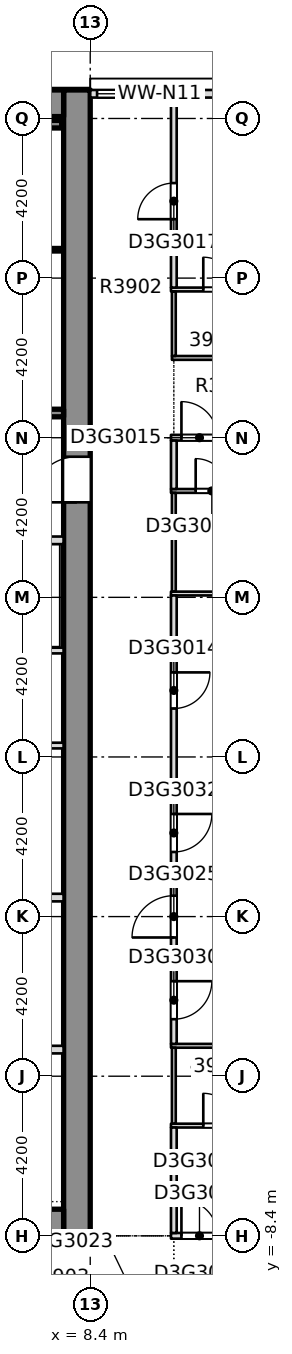
"""IFC4 building model, lengths in metres.
Left out: names, types, materials, properties, quantities, classifications, styles, units other than length and angle.
Written with IfcOpenShell. Run it as: python <this file> out.ifc"""

import sys

from ifc_helpers import new_model, si_unit, direction, frame, frame_2d, origin, place, context, subcontext, project, spatial, rectangle, extrude, element, fill, save


model = new_model("IFC4")
c1 = context("Model", 3, precision=1e-05, world=origin(), true_north=direction((0.0, 1.0)))
c2 = subcontext(c1, "Body", "Model", "MODEL_VIEW")
j1 = project(units=[si_unit("LENGTHUNIT", "METRE"), si_unit("PLANEANGLEUNIT", "RADIAN")], contexts=[c1])
p1 = place(None, origin())
s1 = spatial("IfcSite", under=j1, at=p1, CompositionType="ELEMENT")
p2 = place(p1, origin())
s2 = spatial("IfcBuilding", under=s1, at=p2, CompositionType="ELEMENT")
p3 = place(p2, frame((0.0, 0.0, 153.8)))
s3 = spatial("IfcBuildingStorey", under=s2, at=p3, CompositionType="ELEMENT", Elevation=153.8)
p4 = place(p3, frame((8.05, -8.4, -0.4), z_axis=(0.0, 0.0, 1.0), x_axis=(0.0, 1.0, 0.0)))
e1 = element("IfcWall", 1, at=p4, inside=s3, PredefinedType="SOLIDWALL", context=c2, shape_type="SweptSolid", body=[
    extrude(rectangle(XDim=30.15, YDim=0.7, at=frame_2d((15.075, 0.0))), origin(), (0.0, 0.0, 1.0), 3.45),
])
p5 = place(p4, frame((19.3, 0.0, 0.4)))
e2 = element("IfcOpeningElement", 2, at=p5, cuts=e1, PredefinedType="OPENING", context=c2, shape_type="SweptSolid", body=[
    extrude(rectangle(XDim=1.2, YDim=2.1, at=frame_2d((0.6, 1.05))), frame((0.0, 0.36, 0.0), z_axis=(0.0, -1.0, 0.0), x_axis=(1.0, 0.0, 0.0)), (0.0, 0.0, 1.0), 0.72),
])
p6 = place(p3, frame((-7.7, -8.05, -0.4), z_axis=(0.0, 0.0, 1.0), x_axis=(1.0, 0.0, 0.0)))
e3 = element("IfcWall", 3, at=p6, inside=s3, PredefinedType="SHEAR", context=c2, shape_type="SweptSolid", body=[
    extrude(rectangle(XDim=15.4, YDim=0.7, at=frame_2d((7.7, 0.0))), origin(), (0.0, 0.0, 1.0), 3.45),
])
p7 = place(p6, frame((2.95, 0.0, 0.4)))
e4 = element("IfcOpeningElement", 4, at=p7, cuts=e3, PredefinedType="OPENING", context=c2, shape_type="SweptSolid", body=[
    extrude(rectangle(XDim=1.8, YDim=2.1, at=frame_2d((0.9, 1.05))), frame((0.0, 0.36, 0.0), z_axis=(0.0, -1.0, 0.0), x_axis=(1.0, 0.0, 0.0)), (0.0, 0.0, 1.0), 0.72),
])
p8 = place(p6, frame((10.65, 0.0, 0.4)))
e5 = element("IfcOpeningElement", 5, at=p8, cuts=e3, PredefinedType="OPENING", context=c2, shape_type="SweptSolid", body=[
    extrude(rectangle(XDim=1.8, YDim=2.1, at=frame_2d((0.9, 1.05))), frame((0.0, 0.36, 0.0), z_axis=(0.0, -1.0, 0.0), x_axis=(1.0, 0.0, 0.0)), (0.0, 0.0, 1.0), 0.72),
])
p9 = place(p3, frame((-7.7, 21.4, -0.4), z_axis=(0.0, 0.0, 1.0), x_axis=(1.0, 0.0, 0.0)))
e6 = element("IfcWall", 6, at=p9, inside=s3, PredefinedType="SHEAR", context=c2, shape_type="SweptSolid", body=[
    extrude(rectangle(XDim=15.4, YDim=0.7, at=frame_2d((7.7, 0.0))), origin(), (0.0, 0.0, 1.0), 3.45),
])
p10 = place(p3, frame((10.525, -8.4, 0.0), z_axis=(0.0, 0.0, 1.0), x_axis=(1.0, 0.0, 0.0)))
e7 = element("IfcWall", 7, at=p10, inside=s3, PredefinedType="PARTITIONING", context=c2, shape_type="SweptSolid", body=[
    extrude(rectangle(XDim=11.025, YDim=0.15, at=frame_2d((5.513, 0.0))), origin(), (0.0, 0.0, 1.0), 3.05),
])
p11 = place(p10, frame((0.275, 0.0, 0.0)))
e8 = element("IfcOpeningElement", 8, at=p11, cuts=e7, PredefinedType="OPENING", context=c2, shape_type="SweptSolid", body=[
    extrude(rectangle(XDim=0.95, YDim=2.1, at=frame_2d((0.475, 1.05))), frame((0.0, 0.085, 0.0), z_axis=(0.0, -1.0, 0.0), x_axis=(1.0, 0.0, 0.0)), (0.0, 0.0, 1.0), 0.17),
])
p12 = place(p3, frame((10.525, -5.5, 0.0), z_axis=(0.0, 0.0, 1.0), x_axis=(1.0, 0.0, 0.0)))
e9 = element("IfcWall", 9, at=p12, inside=s3, PredefinedType="PARTITIONING", context=c2, shape_type="SweptSolid", body=[
    extrude(rectangle(XDim=2.523, YDim=0.1, at=frame_2d((1.262, 0.0))), origin(), (0.0, 0.0, 1.0), 3.05),
])
p13 = place(p12, frame((0.85, 0.0, 0.0)))
e10 = element("IfcOpeningElement", 10, at=p13, cuts=e9, PredefinedType="OPENING", context=c2, shape_type="SweptSolid", body=[
    extrude(rectangle(XDim=0.85, YDim=2.1, at=frame_2d((0.425, 1.05))), frame((0.0, 0.06, 0.0), z_axis=(0.0, -1.0, 0.0), x_axis=(1.0, 0.0, 0.0)), (0.0, 0.0, 1.0), 0.12),
])
p14 = place(p3, frame((10.525, -3.4, 0.0), z_axis=(0.0, 0.0, 1.0), x_axis=(1.0, 0.0, 0.0)))
e11 = element("IfcWall", 11, at=p14, inside=s3, PredefinedType="PARTITIONING", context=c2, shape_type="SweptSolid", body=[
    extrude(rectangle(XDim=2.525, YDim=0.1, at=frame_2d((1.263, 0.0))), origin(), (0.0, 0.0, 1.0), 3.05),
])
for number, where, z_axis, x_axis in (
    (12, (10.675, -1.0, 0.0), (0.0, 0.0, 1.0), (1.0, 0.0, 0.0)),
    (13, (10.675, 1.0, 0.0), (0.0, 0.0, 1.0), (1.0, 0.0, 0.0)),
):
    element("IfcWall", number, at=place(p3, frame(where, z_axis=z_axis, x_axis=x_axis)), inside=s3, PredefinedType="PARTITIONING", context=c2, shape_type="SweptSolid", body=[
        extrude(rectangle(XDim=6.075, YDim=0.2, at=frame_2d((3.038, 0.0))), origin(), (0.0, 0.0, 1.0), 3.05),
    ])
p15 = place(p3, frame((10.675, 3.4, 0.0), z_axis=(0.0, 0.0, 1.0), x_axis=(1.0, 0.0, 0.0)))
e14 = element("IfcWall", 14, at=p15, inside=s3, PredefinedType="SOLIDWALL", context=c2, shape_type="SweptSolid", body=[
    extrude(rectangle(XDim=10.875, YDim=0.2, at=frame_2d((5.438, 0.0))), origin(), (0.0, 0.0, 1.0), 3.05),
])
p16 = place(p3, frame((10.525, 8.5, 0.0), z_axis=(0.0, 0.0, 1.0), x_axis=(1.0, 0.0, 0.0)))
e15 = element("IfcWall", 15, at=p16, inside=s3, PredefinedType="PARTITIONING", context=c2, shape_type="SweptSolid", body=[
    extrude(rectangle(XDim=2.825, YDim=0.1, at=frame_2d((1.413, 0.0))), origin(), (0.0, 0.0, 1.0), 3.05),
])
p17 = place(p3, frame((10.525, 11.2, 0.0), z_axis=(0.0, 0.0, 1.0), x_axis=(1.0, 0.0, 0.0)))
e16 = element("IfcWall", 16, at=p17, inside=s3, PredefinedType="PARTITIONING", context=c2, shape_type="SweptSolid", body=[
    extrude(rectangle(XDim=2.825, YDim=0.1, at=frame_2d((1.413, 0.0))), origin(), (0.0, 0.0, 1.0), 3.05),
])
p18 = place(p17, frame((0.65, 0.0, 0.0)))
e17 = element("IfcOpeningElement", 17, at=p18, cuts=e16, PredefinedType="OPENING", context=c2, shape_type="SweptSolid", body=[
    extrude(rectangle(XDim=0.85, YDim=2.1, at=frame_2d((0.425, 1.05))), frame((0.0, 0.06, 0.0), z_axis=(0.0, -1.0, 0.0), x_axis=(1.0, 0.0, 0.0)), (0.0, 0.0, 1.0), 0.12),
])
p19 = place(p3, frame((10.525, 12.6, 0.0), z_axis=(0.0, 0.0, 1.0), x_axis=(1.0, 0.0, 0.0)))
e18 = element("IfcWall", 18, at=p19, inside=s3, PredefinedType="PARTITIONING", context=c2, shape_type="SweptSolid", body=[
    extrude(rectangle(XDim=2.625, YDim=0.15, at=frame_2d((1.312, 0.0))), origin(), (0.0, 0.0, 1.0), 3.05),
])
p20 = place(p19, frame((0.275, 0.0, 0.0)))
e19 = element("IfcOpeningElement", 19, at=p20, cuts=e18, PredefinedType="OPENING", context=c2, shape_type="SweptSolid", body=[
    extrude(rectangle(XDim=0.95, YDim=2.1, at=frame_2d((0.475, 1.05))), frame((0.0, 0.085, 0.0), z_axis=(0.0, -1.0, 0.0), x_axis=(1.0, 0.0, 0.0)), (0.0, 0.0, 1.0), 0.17),
])
p21 = place(p3, frame((10.55, 14.7, 0.0), z_axis=(0.0, 0.0, 1.0), x_axis=(1.0, 0.0, 0.0)))
e20 = element("IfcWall", 20, at=p21, inside=s3, PredefinedType="PARTITIONING", context=c2, shape_type="SweptSolid", body=[
    extrude(rectangle(XDim=2.5, YDim=0.1, at=frame_2d((1.25, 0.0))), origin(), (0.0, 0.0, 1.0), 3.05),
])
p22 = place(p3, frame((10.525, 16.5, 0.0), z_axis=(0.0, 0.0, 1.0), x_axis=(1.0, 0.0, 0.0)))
e21 = element("IfcWall", 21, at=p22, inside=s3, PredefinedType="PARTITIONING", context=c2, shape_type="SweptSolid", body=[
    extrude(rectangle(XDim=2.525, YDim=0.1, at=frame_2d((1.263, 0.0))), origin(), (0.0, 0.0, 1.0), 3.05),
])
p23 = place(p22, frame((0.85, 0.0, 0.0)))
e22 = element("IfcOpeningElement", 22, at=p23, cuts=e21, PredefinedType="OPENING", context=c2, shape_type="SweptSolid", body=[
    extrude(rectangle(XDim=0.85, YDim=2.1, at=frame_2d((0.425, 1.05))), frame((0.0, 0.06, 0.0), z_axis=(0.0, -1.0, 0.0), x_axis=(1.0, 0.0, 0.0)), (0.0, 0.0, 1.0), 0.12),
])
p24 = place(p3, frame((10.6, -8.325, 0.0), z_axis=(0.0, 0.0, 1.0), x_axis=(0.0, 1.0, 0.0)))
e23 = element("IfcWall", 23, at=p24, inside=s3, PredefinedType="PARTITIONING", context=c2, shape_type="SweptSolid", body=[
    extrude(rectangle(XDim=2.775, YDim=0.15, at=frame_2d((1.387, 0.0))), origin(), (0.0, 0.0, 1.0), 3.05),
])
p25 = place(p3, frame((10.6, -5.45, 0.0), z_axis=(0.0, 0.0, 1.0), x_axis=(0.0, 1.0, 0.0)))
e24 = element("IfcWall", 24, at=p25, inside=s3, PredefinedType="PARTITIONING", context=c2, shape_type="SweptSolid", body=[
    extrude(rectangle(XDim=2.0, YDim=0.1, at=frame_2d((1.0, 0.0))), origin(), (0.0, 0.0, 1.0), 3.05),
])
p26 = place(p3, frame((10.6, -3.35, 0.0), z_axis=(0.0, 0.0, 1.0), x_axis=(0.0, 1.0, 0.0)))
e25 = element("IfcWall", 25, at=p26, inside=s3, PredefinedType="PARTITIONING", context=c2, shape_type="SweptSolid", body=[
    extrude(rectangle(XDim=11.8, YDim=0.15, at=frame_2d((5.9, 0.0))), origin(), (0.0, 0.0, 1.0), 3.05),
])
p27 = place(p26, frame((8.825, 0.0, 0.0)))
e26 = element("IfcOpeningElement", 26, at=p27, cuts=e25, PredefinedType="OPENING", context=c2, shape_type="SweptSolid", body=[
    extrude(rectangle(XDim=0.95, YDim=2.1, at=frame_2d((0.475, 1.05))), frame((0.0, 0.085, 0.0), z_axis=(0.0, -1.0, 0.0), x_axis=(1.0, 0.0, 0.0)), (0.0, 0.0, 1.0), 0.17),
])
p28 = place(p26, frame((2.8, 0.0, 0.0)))
e27 = element("IfcOpeningElement", 27, at=p28, cuts=e25, PredefinedType="OPENING", context=c2, shape_type="SweptSolid", body=[
    extrude(rectangle(XDim=1.1, YDim=2.1, at=frame_2d((0.55, 1.05))), frame((0.0, 0.085, 0.0), z_axis=(0.0, -1.0, 0.0), x_axis=(1.0, 0.0, 0.0)), (0.0, 0.0, 1.0), 0.17),
])
p29 = place(p26, frame((0.65, 0.0, 0.0)))
e28 = element("IfcOpeningElement", 28, at=p29, cuts=e25, PredefinedType="OPENING", context=c2, shape_type="SweptSolid", body=[
    extrude(rectangle(XDim=1.0, YDim=2.1, at=frame_2d((0.5, 1.05))), frame((0.0, 0.085, 0.0), z_axis=(0.0, -1.0, 0.0), x_axis=(1.0, 0.0, 0.0)), (0.0, 0.0, 1.0), 0.17),
])
p30 = place(p26, frame((5.05, 0.0, 0.0)))
e29 = element("IfcOpeningElement", 29, at=p30, cuts=e25, PredefinedType="OPENING", context=c2, shape_type="SweptSolid", body=[
    extrude(rectangle(XDim=1.0, YDim=2.1, at=frame_2d((0.5, 1.05))), frame((0.0, 0.085, 0.0), z_axis=(0.0, -1.0, 0.0), x_axis=(1.0, 0.0, 0.0)), (0.0, 0.0, 1.0), 0.17),
])
p31 = place(p3, frame((10.6, 8.55, 0.0), z_axis=(0.0, 0.0, 1.0), x_axis=(0.0, 1.0, 0.0)))
e30 = element("IfcWall", 30, at=p31, inside=s3, PredefinedType="PARTITIONING", context=c2, shape_type="SweptSolid", body=[
    extrude(rectangle(XDim=2.6, YDim=0.1, at=frame_2d((1.3, 0.0))), origin(), (0.0, 0.0, 1.0), 3.05),
])
p32 = place(p3, frame((10.6, 11.25, 0.0), z_axis=(0.0, 0.0, 1.0), x_axis=(0.0, 1.0, 0.0)))
e31 = element("IfcWall", 31, at=p32, inside=s3, PredefinedType="PARTITIONING", context=c2, shape_type="SweptSolid", body=[
    extrude(rectangle(XDim=1.275, YDim=0.15, at=frame_2d((0.637, 0.0))), origin(), (0.0, 0.0, 1.0), 3.05),
])
p33 = place(p3, frame((10.6, 14.75, 0.0), z_axis=(0.0, 0.0, 1.0), x_axis=(0.0, 1.0, 0.0)))
e32 = element("IfcWall", 32, at=p33, inside=s3, PredefinedType="PARTITIONING", context=c2, shape_type="SweptSolid", body=[
    extrude(rectangle(XDim=1.7, YDim=0.1, at=frame_2d((0.85, 0.0))), origin(), (0.0, 0.0, 1.0), 3.05),
])
p34 = place(p3, frame((10.6, 16.55, 0.0), z_axis=(0.0, 0.0, 1.0), x_axis=(0.0, 1.0, 0.0)))
e33 = element("IfcWall", 33, at=p34, inside=s3, PredefinedType="PARTITIONING", context=c2, shape_type="SweptSolid", body=[
    extrude(rectangle(XDim=5.0, YDim=0.15, at=frame_2d((2.5, 0.0))), origin(), (0.0, 0.0, 1.0), 3.05),
])
p35 = place(p34, frame((1.8, 0.0, 0.0)))
e34 = element("IfcOpeningElement", 34, at=p35, cuts=e33, PredefinedType="OPENING", context=c2, shape_type="SweptSolid", body=[
    extrude(rectangle(XDim=0.95, YDim=2.1, at=frame_2d((0.475, 1.05))), frame((0.0, 0.085, 0.0), z_axis=(0.0, -1.0, 0.0), x_axis=(1.0, 0.0, 0.0)), (0.0, 0.0, 1.0), 0.17),
])
p36 = place(p3, frame((12.05, 21.65, 0.0), z_axis=(0.0, 0.0, 1.0), x_axis=(-1.0, 0.0, 0.0)))
e35 = element("IfcWall", 35, at=p36, inside=s3, PredefinedType="STANDARD", context=c2, shape_type="SweptSolid", body=[
    extrude(rectangle(XDim=3.65, YDim=0.2, at=frame_2d((1.825, 0.0))), origin(), (0.0, 0.0, 1.0), 3.05),
])
p37 = place(p36, frame((1.67, 0.0, 0.2)))
e36 = element("IfcOpeningElement", 36, at=p37, cuts=e35, PredefinedType="OPENING", context=c2, shape_type="SweptSolid", body=[
    extrude(rectangle(XDim=1.8, YDim=2.65, at=frame_2d((0.9, 1.325))), frame((0.0, 0.11, 0.0), z_axis=(0.0, -1.0, 0.0), x_axis=(1.0, 0.0, 0.0)), (0.0, 0.0, 1.0), 0.22),
])
for number, where, z_axis, x_axis in (
    (37, (5.575, -3.5, 0.0), (0.0, 0.0, 1.0), (1.0, 0.0, 0.0)),
    (38, (5.575, 0.5, 0.0), (0.0, 0.0, 1.0), (1.0, 0.0, 0.0)),
):
    element("IfcWall", number, at=place(p3, frame(where, z_axis=z_axis, x_axis=x_axis)), inside=s3, PredefinedType="PARTITIONING", context=c2, shape_type="SweptSolid", body=[
        extrude(rectangle(XDim=2.124, YDim=0.2, at=frame_2d((1.062, 0.0))), origin(), (0.0, 0.0, 1.0), 3.05),
    ])
p38 = place(p3, frame((5.425, 4.5, 0.0), z_axis=(0.0, 0.0, 1.0), x_axis=(1.0, 0.0, 0.0)))
e39 = element("IfcWall", 39, at=p38, inside=s3, PredefinedType="PARTITIONING", context=c2, shape_type="SweptSolid", body=[
    extrude(rectangle(XDim=2.274, YDim=0.15, at=frame_2d((1.137, 0.0))), origin(), (0.0, 0.0, 1.0), 3.05),
])
p39 = place(p3, frame((-7.699, 7.0, 0.0), z_axis=(0.0, 0.0, 1.0), x_axis=(1.0, 0.0, 0.0)))
e40 = element("IfcWall", 40, at=p39, inside=s3, PredefinedType="PARTITIONING", context=c2, shape_type="SweptSolid", body=[
    extrude(rectangle(XDim=15.398, YDim=0.15, at=frame_2d((7.699, 0.0))), origin(), (0.0, 0.0, 1.0), 3.05),
])
p40 = place(p39, frame((6.999, 0.0, 0.0)))
e41 = element("IfcOpeningElement", 41, at=p40, cuts=e40, PredefinedType="OPENING", context=c2, shape_type="SweptSolid", body=[
    extrude(rectangle(XDim=1.4, YDim=2.1, at=frame_2d((0.7, 1.05))), frame((0.0, 0.085, 0.0), z_axis=(0.0, -1.0, 0.0), x_axis=(1.0, 0.0, 0.0)), (0.0, 0.0, 1.0), 0.17),
])
p41 = place(p3, frame((3.6, 9.9, 0.0), z_axis=(0.0, 0.0, 1.0), x_axis=(1.0, 0.0, 0.0)))
e42 = element("IfcWall", 42, at=p41, inside=s3, PredefinedType="PARTITIONING", context=c2, shape_type="SweptSolid", body=[
    extrude(rectangle(XDim=4.099, YDim=0.2, at=frame_2d((2.049, 0.0))), origin(), (0.0, 0.0, 1.0), 3.05),
])
p42 = place(p41, frame((2.25, 0.0, 0.0)))
e43 = element("IfcOpeningElement", 43, at=p42, cuts=e42, PredefinedType="OPENING", context=c2, shape_type="SweptSolid", body=[
    extrude(rectangle(XDim=1.1, YDim=2.1, at=frame_2d((0.55, 1.05))), frame((0.0, 0.11, 0.0), z_axis=(0.0, -1.0, 0.0), x_axis=(1.0, 0.0, 0.0)), (0.0, 0.0, 1.0), 0.22),
])
p43 = place(p3, frame((3.425, 13.25, 0.0), z_axis=(0.0, 0.0, 1.0), x_axis=(1.0, 0.0, 0.0)))
e44 = element("IfcWall", 44, at=p43, inside=s3, PredefinedType="SOLIDWALL", context=c2, shape_type="SweptSolid", body=[
    extrude(rectangle(XDim=4.274, YDim=0.2, at=frame_2d((2.137, 0.0))), origin(), (0.0, 0.0, 1.0), 3.05),
])
p44 = place(p43, frame((1.825, 0.0, 0.0)))
e45 = element("IfcOpeningElement", 45, at=p44, cuts=e44, PredefinedType="OPENING", context=c2, shape_type="SweptSolid", body=[
    extrude(rectangle(XDim=1.2, YDim=2.1, at=frame_2d((0.6, 1.05))), frame((0.0, 0.11, 0.0), z_axis=(0.0, -1.0, 0.0), x_axis=(1.0, 0.0, 0.0)), (0.0, 0.0, 1.0), 0.22),
])
p45 = place(p3, frame((4.1, 20.85, 0.0), z_axis=(0.0, 0.0, 1.0), x_axis=(1.0, 0.0, 0.0)))
e46 = element("IfcWall", 46, at=p45, inside=s3, PredefinedType="SOLIDWALL", context=c2, shape_type="SweptSolid", body=[
    extrude(rectangle(XDim=3.55, YDim=0.2, at=frame_2d((1.775, 0.0))), origin(), (0.0, 0.0, 1.0), 3.05),
])
p46 = place(p11, origin())
e47 = element("IfcDoor", 47, at=p46, inside=s3, OperationType="SINGLE_SWING_LEFT", PredefinedType="DOOR", context=c2, shape_type="SweptSolid", body=[
    extrude(rectangle(XDim=0.95, YDim=2.1, at=frame_2d((0.475, 1.05))), frame((0.0, 0.025, 0.0), z_axis=(0.0, -1.0, 0.0), x_axis=(1.0, 0.0, 0.0)), (0.0, 0.0, 1.0), 0.05),
])
fill(e8, e47)
p47 = place(p13, origin())
e48 = element("IfcDoor", 48, at=p47, inside=s3, OperationType="SINGLE_SWING_LEFT", PredefinedType="DOOR", context=c2, shape_type="SweptSolid", body=[
    extrude(rectangle(XDim=0.85, YDim=2.1, at=frame_2d((0.425, 1.05))), frame((0.0, 0.025, 0.0), z_axis=(0.0, -1.0, 0.0), x_axis=(1.0, 0.0, 0.0)), (0.0, 0.0, 1.0), 0.05),
])
fill(e10, e48)
p48 = place(p27, origin())
e49 = element("IfcDoor", 49, at=p48, inside=s3, OperationType="SINGLE_SWING_LEFT", PredefinedType="DOOR", context=c2, shape_type="SweptSolid", body=[
    extrude(rectangle(XDim=0.95, YDim=2.1, at=frame_2d((0.475, 1.05))), frame((0.0, 0.025, 0.0), z_axis=(0.0, -1.0, 0.0), x_axis=(1.0, 0.0, 0.0)), (0.0, 0.0, 1.0), 0.05),
])
fill(e26, e49)
p49 = place(p20, origin())
e50 = element("IfcDoor", 50, at=p49, inside=s3, OperationType="SINGLE_SWING_RIGHT", PredefinedType="DOOR", context=c2, shape_type="SweptSolid", body=[
    extrude(rectangle(XDim=0.95, YDim=2.1, at=frame_2d((0.475, 1.05))), frame((0.0, 0.025, 0.0), z_axis=(0.0, -1.0, 0.0), x_axis=(1.0, 0.0, 0.0)), (0.0, 0.0, 1.0), 0.05),
])
fill(e19, e50)
p50 = place(p18, origin())
e51 = element("IfcDoor", 51, at=p50, inside=s3, OperationType="SINGLE_SWING_RIGHT", PredefinedType="DOOR", context=c2, shape_type="SweptSolid", body=[
    extrude(rectangle(XDim=0.85, YDim=2.1, at=frame_2d((0.425, 1.05))), frame((0.0, 0.025, 0.0), z_axis=(0.0, -1.0, 0.0), x_axis=(1.0, 0.0, 0.0)), (0.0, 0.0, 1.0), 0.05),
])
fill(e17, e51)
p51 = place(p35, origin())
e52 = element("IfcDoor", 52, at=p51, inside=s3, OperationType="SINGLE_SWING_LEFT", PredefinedType="DOOR", context=c2, shape_type="SweptSolid", body=[
    extrude(rectangle(XDim=0.95, YDim=2.1, at=frame_2d((0.475, 1.05))), frame((0.0, 0.025, 0.0), z_axis=(0.0, -1.0, 0.0), x_axis=(1.0, 0.0, 0.0)), (0.0, 0.0, 1.0), 0.05),
])
fill(e34, e52)
p52 = place(p23, origin())
e53 = element("IfcDoor", 53, at=p52, inside=s3, OperationType="SINGLE_SWING_RIGHT", PredefinedType="DOOR", context=c2, shape_type="SweptSolid", body=[
    extrude(rectangle(XDim=0.85, YDim=2.1, at=frame_2d((0.425, 1.05))), frame((0.0, 0.025, 0.0), z_axis=(0.0, -1.0, 0.0), x_axis=(1.0, 0.0, 0.0)), (0.0, 0.0, 1.0), 0.05),
])
fill(e22, e53)
p53 = place(p28, origin())
e54 = element("IfcDoor", 54, at=p53, inside=s3, OperationType="SINGLE_SWING_LEFT", PredefinedType="DOOR", context=c2, shape_type="SweptSolid", body=[
    extrude(rectangle(XDim=1.1, YDim=2.1, at=frame_2d((0.55, 1.05))), frame((0.0, 0.025, 0.0), z_axis=(0.0, -1.0, 0.0), x_axis=(1.0, 0.0, 0.0)), (0.0, 0.0, 1.0), 0.05),
])
fill(e27, e54)
p54 = place(p29, origin())
e55 = element("IfcDoor", 55, at=p54, inside=s3, OperationType="SINGLE_SWING_RIGHT", PredefinedType="DOOR", context=c2, shape_type="SweptSolid", body=[
    extrude(rectangle(XDim=1.0, YDim=2.1, at=frame_2d((0.5, 1.05))), frame((0.0, 0.025, 0.0), z_axis=(0.0, -1.0, 0.0), x_axis=(1.0, 0.0, 0.0)), (0.0, 0.0, 1.0), 0.05),
])
fill(e28, e55)
p55 = place(p30, origin())
e56 = element("IfcDoor", 56, at=p55, inside=s3, OperationType="SINGLE_SWING_LEFT", PredefinedType="DOOR", context=c2, shape_type="SweptSolid", body=[
    extrude(rectangle(XDim=1.0, YDim=2.1, at=frame_2d((0.5, 1.05))), frame((0.0, 0.025, 0.0), z_axis=(0.0, -1.0, 0.0), x_axis=(1.0, 0.0, 0.0)), (0.0, 0.0, 1.0), 0.05),
])
fill(e29, e56)
p56 = place(p37, origin())
e57 = element("IfcWindow", 57, at=p56, inside=s3, PartitioningType="SINGLE_PANEL", PredefinedType="WINDOW", context=c2, shape_type="SweptSolid", body=[
    extrude(rectangle(XDim=1.8, YDim=2.65, at=frame_2d((0.9, 1.325))), frame((0.0, 0.03, 0.0), z_axis=(0.0, -1.0, 0.0), x_axis=(1.0, 0.0, 0.0)), (0.0, 0.0, 1.0), 0.06),
])
fill(e36, e57)
p57 = place(p5, origin())
e58 = element("IfcDoor", 58, at=p57, inside=s3, OperationType="SINGLE_SWING_LEFT", PredefinedType="DOOR", context=c2, shape_type="SweptSolid", body=[
    extrude(rectangle(XDim=1.2, YDim=2.1, at=frame_2d((0.6, 1.05))), frame((0.0, 0.025, 0.0), z_axis=(0.0, -1.0, 0.0), x_axis=(1.0, 0.0, 0.0)), (0.0, 0.0, 1.0), 0.05),
])
fill(e2, e58)
save(model, sys.argv[1])
